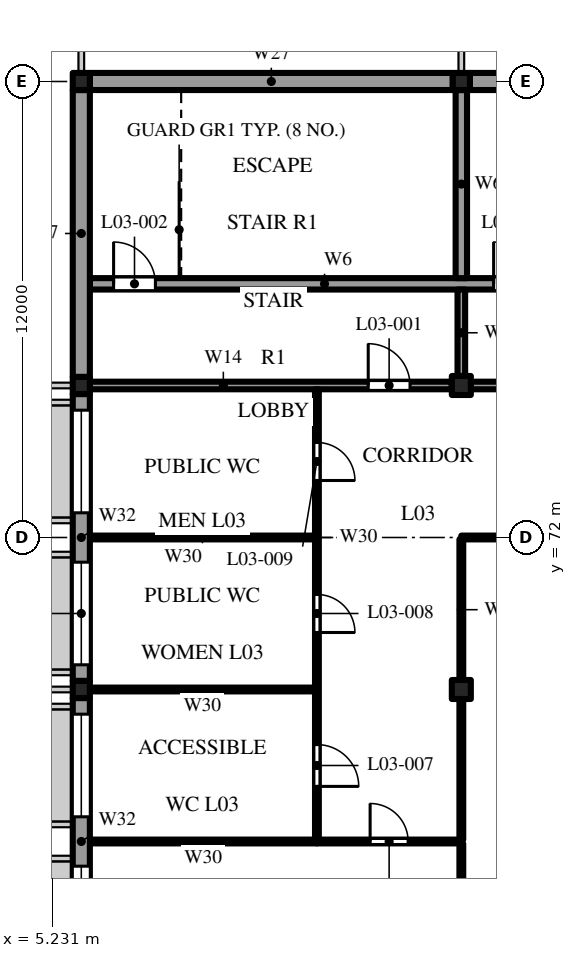
"""IFC4 building model, lengths in metres.
Left out: names, types, materials, properties, quantities, classifications, styles, units other than length and angle.
Written with IfcOpenShell. Run it as: python <this file> out.ifc"""

import sys

from ifc_helpers import new_model, si_unit, direction, frame, frame_2d, origin, origin_2d, place, context, subcontext, project, spatial, polyline, rectangle, outline, extrude, element, fill, save


model = new_model("IFC4")
c1 = context("Model", 3, precision=1e-05, world=origin(), true_north=direction((0.0, 1.0)))
c2 = subcontext(c1, "Body", "Model", "MODEL_VIEW")
j1 = project(units=[si_unit("LENGTHUNIT", "METRE"), si_unit("PLANEANGLEUNIT", "RADIAN")], contexts=[c1])
p1 = place(None, origin())
s1 = spatial("IfcSite", under=j1, at=p1, CompositionType="ELEMENT")
p2 = place(p1, origin())
s2 = spatial("IfcBuilding", under=s1, at=p2, CompositionType="ELEMENT")
p3 = place(p2, frame((0.0, 0.0, 16.8)))
s3 = spatial("IfcBuildingStorey", under=s2, at=p3, CompositionType="ELEMENT", Elevation=16.8)
for number, where, z_axis, x_axis in (
    (1, (6.0, 68.0, 0.0), (0.0, 0.0, 1.0), (1.0, 0.0, 0.0)),
    (2, (6.0, 76.0, 0.0), (0.0, 0.0, 1.0), (1.0, 0.0, 0.0)),
    (3, (6.0, 84.0, 0.0), (0.0, 0.0, 1.0), (1.0, 0.0, 0.0)),
):
    element("IfcColumn", number, at=place(p3, frame(where, z_axis=z_axis, x_axis=x_axis)), inside=s3, PredefinedType="COLUMN", context=c2, shape_type="SweptSolid", body=[
        extrude(rectangle(XDim=0.45, YDim=0.45, at=origin_2d()), origin(), (0.0, 0.0, 1.0), 4.8),
    ])
for number, where, z_axis, x_axis in (
    (4, (16.0, 68.0, 0.0), (0.0, 0.0, 1.0), (1.0, 0.0, 0.0)),
    (5, (16.0, 76.0, 0.0), (0.0, 0.0, 1.0), (1.0, 0.0, 0.0)),
):
    element("IfcColumn", number, at=place(p3, frame(where, z_axis=z_axis, x_axis=x_axis)), inside=s3, PredefinedType="COLUMN", context=c2, shape_type="SweptSolid", body=[
        extrude(rectangle(XDim=0.5, YDim=0.5, at=origin_2d()), origin(), (0.0, 0.0, 1.0), 4.8),
    ])
p4 = place(p3, frame((16.0, 84.0, 0.0), z_axis=(0.0, 0.0, 1.0), x_axis=(1.0, 0.0, 0.0)))
e6 = element("IfcColumn", 6, at=p4, inside=s3, PredefinedType="COLUMN", context=c2, shape_type="SweptSolid", body=[
    extrude(rectangle(XDim=0.45, YDim=0.45, at=origin_2d()), origin(), (0.0, 0.0, 1.0), 4.8),
])
p5 = place(p3, frame((6.225, 64.0, 0.0), z_axis=(0.0, 0.0, 1.0), x_axis=(1.0, 0.0, 0.0)))
e7 = element("IfcWall", 7, at=p5, inside=s3, PredefinedType="PARTITIONING", context=c2, shape_type="SweptSolid", body=[
    extrude(rectangle(XDim=5.975, YDim=0.1, at=frame_2d((2.987, 0.0))), origin(), (0.0, 0.0, 1.0), 7.792),
])
p6 = place(p3, frame((12.2, 64.0, 0.0), z_axis=(0.0, 0.0, 1.0), x_axis=(1.0, 0.0, 0.0)))
e8 = element("IfcWall", 8, at=p6, inside=s3, PredefinedType="PARTITIONING", context=c2, shape_type="SweptSolid", body=[
    extrude(rectangle(XDim=3.8, YDim=0.1, at=frame_2d((1.9, 0.0))), origin(), (0.0, 0.0, 1.0), 7.792),
])
p7 = place(p6, frame((1.4, 0.0, 0.0)))
e9 = element("IfcOpeningElement", 9, at=p7, cuts=e8, PredefinedType="OPENING", context=c2, shape_type="SweptSolid", body=[
    extrude(rectangle(XDim=1.0, YDim=2.1, at=frame_2d((0.5, 1.05))), frame((0.0, 0.06, 0.0), z_axis=(0.0, -1.0, 0.0), x_axis=(1.0, 0.0, 0.0)), (0.0, 0.0, 1.0), 0.12),
])
p8 = place(p3, frame((6.225, 68.0, 0.0), z_axis=(0.0, 0.0, 1.0), x_axis=(1.0, 0.0, 0.0)))
e10 = element("IfcWall", 10, at=p8, inside=s3, PredefinedType="PARTITIONING", context=c2, shape_type="SweptSolid", body=[
    extrude(rectangle(XDim=5.925, YDim=0.1, at=frame_2d((2.962, 0.0))), origin(), (0.0, 0.0, 1.0), 8.642),
])
p9 = place(p3, frame((6.225, 72.0, 0.0), z_axis=(0.0, 0.0, 1.0), x_axis=(1.0, 0.0, 0.0)))
e11 = element("IfcWall", 11, at=p9, inside=s3, PredefinedType="PARTITIONING", context=c2, shape_type="SweptSolid", body=[
    extrude(rectangle(XDim=5.925, YDim=0.1, at=frame_2d((2.962, 0.0))), origin(), (0.0, 0.0, 1.0), 9.493),
])
p10 = place(p3, frame((16.0, 72.0, 0.0), z_axis=(0.0, 0.0, 1.0), x_axis=(1.0, 0.0, 0.0)))
e12 = element("IfcWall", 12, at=p10, inside=s3, PredefinedType="PARTITIONING", context=c2, shape_type="SweptSolid", body=[
    extrude(rectangle(XDim=29.775, YDim=0.1, at=frame_2d((14.887, 0.0))), origin(), (0.0, 0.0, 1.0), 9.493),
])
p11 = place(p10, frame((9.1, 0.0, 0.0)))
e13 = element("IfcOpeningElement", 13, at=p11, cuts=e12, PredefinedType="OPENING", context=c2, shape_type="SweptSolid", body=[
    extrude(rectangle(XDim=1.8, YDim=2.1, at=frame_2d((0.9, 1.05))), frame((0.0, 0.06, 0.0), z_axis=(0.0, -1.0, 0.0), x_axis=(1.0, 0.0, 0.0)), (0.0, 0.0, 1.0), 0.12),
])
p12 = place(p10, frame((24.5, 0.0, 0.0)))
e14 = element("IfcOpeningElement", 14, at=p12, cuts=e12, PredefinedType="OPENING", context=c2, shape_type="SweptSolid", body=[
    extrude(rectangle(XDim=1.0, YDim=2.1, at=frame_2d((0.5, 1.05))), frame((0.0, 0.06, 0.0), z_axis=(0.0, -1.0, 0.0), x_axis=(1.0, 0.0, 0.0)), (0.0, 0.0, 1.0), 0.12),
])
p13 = place(p3, frame((6.225, 76.0, 0.0), z_axis=(0.0, 0.0, 1.0), x_axis=(1.0, 0.0, 0.0)))
e15 = element("IfcWall", 15, at=p13, inside=s3, PredefinedType="SOLIDWALL", context=c2, shape_type="SweptSolid", body=[
    extrude(rectangle(XDim=9.525, YDim=0.2, at=frame_2d((4.762, 0.0))), origin(), (0.0, 0.0, 1.0), 10.343),
])
p14 = place(p13, frame((7.325, 0.0, 0.0)))
e16 = element("IfcOpeningElement", 16, at=p14, cuts=e15, PredefinedType="OPENING", context=c2, shape_type="SweptSolid", body=[
    extrude(rectangle(XDim=1.1, YDim=2.1, at=frame_2d((0.55, 1.05))), frame((0.0, 0.11, 0.0), z_axis=(0.0, -1.0, 0.0), x_axis=(1.0, 0.0, 0.0)), (0.0, 0.0, 1.0), 0.22),
])
p15 = place(p3, frame((16.25, 76.0, 0.0), z_axis=(0.0, 0.0, 1.0), x_axis=(1.0, 0.0, 0.0)))
e17 = element("IfcWall", 17, at=p15, inside=s3, PredefinedType="SOLIDWALL", context=c2, shape_type="SweptSolid", body=[
    extrude(rectangle(XDim=9.5, YDim=0.2, at=frame_2d((4.75, 0.0))), origin(), (0.0, 0.0, 1.0), 10.343),
])
p16 = place(p15, frame((4.2, 0.0, 0.0)))
e18 = element("IfcOpeningElement", 18, at=p16, cuts=e17, PredefinedType="OPENING", context=c2, shape_type="SweptSolid", body=[
    extrude(rectangle(XDim=1.1, YDim=2.1, at=frame_2d((0.55, 1.05))), frame((0.0, 0.11, 0.0), z_axis=(0.0, -1.0, 0.0), x_axis=(1.0, 0.0, 0.0)), (0.0, 0.0, 1.0), 0.22),
])
p17 = place(p3, frame((6.225, 78.675, 0.0), z_axis=(0.0, 0.0, 1.0), x_axis=(1.0, 0.0, 0.0)))
e19 = element("IfcWall", 19, at=p17, inside=s3, PredefinedType="SHEAR", context=c2, shape_type="SweptSolid", body=[
    extrude(rectangle(XDim=19.775, YDim=0.3, at=frame_2d((9.887, 0.0))), origin(), (0.0, 0.0, 1.0), 10.911),
])
p18 = place(p17, frame((0.625, 0.0, 0.0)))
e20 = element("IfcOpeningElement", 20, at=p18, cuts=e19, PredefinedType="OPENING", context=c2, shape_type="SweptSolid", body=[
    extrude(rectangle(XDim=1.1, YDim=2.1, at=frame_2d((0.55, 1.05))), frame((0.0, 0.16, 0.0), z_axis=(0.0, -1.0, 0.0), x_axis=(1.0, 0.0, 0.0)), (0.0, 0.0, 1.0), 0.32),
])
p19 = place(p17, frame((10.625, 0.0, 0.0)))
e21 = element("IfcOpeningElement", 21, at=p19, cuts=e19, PredefinedType="OPENING", context=c2, shape_type="SweptSolid", body=[
    extrude(rectangle(XDim=1.1, YDim=2.1, at=frame_2d((0.55, 1.05))), frame((0.0, 0.16, 0.0), z_axis=(0.0, -1.0, 0.0), x_axis=(1.0, 0.0, 0.0)), (0.0, 0.0, 1.0), 0.32),
])
for number, where, z_axis, x_axis in (
    (22, (15.775, 84.0, 0.0), (0.0, 0.0, 1.0), (-1.0, 0.0, 0.0)),
    (23, (25.775, 84.0, 0.0), (0.0, 0.0, 1.0), (-1.0, 0.0, 0.0)),
):
    element("IfcWall", number, at=place(p3, frame(where, z_axis=z_axis, x_axis=x_axis)), inside=s3, PredefinedType="SOLIDWALL", context=c2, shape_type="SweptSolid", body=[
        extrude(rectangle(XDim=9.55, YDim=0.45, at=frame_2d((4.775, 0.0))), origin(), (0.0, 0.0, 1.0), 12.043),
    ])
p20 = place(p3, frame((6.0, 67.775, 0.0), z_axis=(0.0, 0.0, 1.0), x_axis=(0.0, -1.0, 0.0)))
e24 = element("IfcWall", 24, at=p20, inside=s3, PredefinedType="SOLIDWALL", context=c2, shape_type="SweptSolid", body=[
    extrude(outline(polyline([(0.0, 0.0), (7.55, 0.0), (7.55, 6.99), (0.0, 8.595), (0.0, 0.0)])), frame((0.0, 0.225, 0.0), z_axis=(0.0, -1.0, 0.0), x_axis=(1.0, 0.0, 0.0)), (0.0, 0.0, 1.0), 0.45),
])
p21 = place(p20, frame((4.425, 0.0, 0.8)))
e25 = element("IfcOpeningElement", 25, at=p21, cuts=e24, PredefinedType="OPENING", context=c2, shape_type="SweptSolid", body=[
    extrude(rectangle(XDim=2.7, YDim=2.4, at=frame_2d((1.35, 1.2))), frame((0.0, 0.235, 0.0), z_axis=(0.0, -1.0, 0.0), x_axis=(1.0, 0.0, 0.0)), (0.0, 0.0, 1.0), 0.47),
])
p22 = place(p20, frame((0.425, 0.0, 0.8)))
e26 = element("IfcOpeningElement", 26, at=p22, cuts=e24, PredefinedType="OPENING", context=c2, shape_type="SweptSolid", body=[
    extrude(rectangle(XDim=2.7, YDim=2.4, at=frame_2d((1.35, 1.2))), frame((0.0, 0.235, 0.0), z_axis=(0.0, -1.0, 0.0), x_axis=(1.0, 0.0, 0.0)), (0.0, 0.0, 1.0), 0.47),
])
p23 = place(p3, frame((6.0, 75.775, 0.0), z_axis=(0.0, 0.0, 1.0), x_axis=(0.0, -1.0, 0.0)))
e27 = element("IfcWall", 27, at=p23, inside=s3, PredefinedType="SOLIDWALL", context=c2, shape_type="SweptSolid", body=[
    extrude(outline(polyline([(0.0, 0.0), (7.55, 0.0), (7.55, 8.69), (0.0, 10.295), (0.0, 0.0)])), frame((0.0, 0.225, 0.0), z_axis=(0.0, -1.0, 0.0), x_axis=(1.0, 0.0, 0.0)), (0.0, 0.0, 1.0), 0.45),
])
p24 = place(p23, frame((4.425, 0.0, 0.8)))
e28 = element("IfcOpeningElement", 28, at=p24, cuts=e27, PredefinedType="OPENING", context=c2, shape_type="SweptSolid", body=[
    extrude(rectangle(XDim=2.7, YDim=2.4, at=frame_2d((1.35, 1.2))), frame((0.0, 0.235, 0.0), z_axis=(0.0, -1.0, 0.0), x_axis=(1.0, 0.0, 0.0)), (0.0, 0.0, 1.0), 0.47),
])
p25 = place(p23, frame((0.425, 0.0, 0.8)))
e29 = element("IfcOpeningElement", 29, at=p25, cuts=e27, PredefinedType="OPENING", context=c2, shape_type="SweptSolid", body=[
    extrude(rectangle(XDim=2.7, YDim=2.4, at=frame_2d((1.35, 1.2))), frame((0.0, 0.235, 0.0), z_axis=(0.0, -1.0, 0.0), x_axis=(1.0, 0.0, 0.0)), (0.0, 0.0, 1.0), 0.47),
])
p26 = place(p3, frame((6.0, 83.775, 0.0), z_axis=(0.0, 0.0, 1.0), x_axis=(0.0, -1.0, 0.0)))
e30 = element("IfcWall", 30, at=p26, inside=s3, PredefinedType="SOLIDWALL", context=c2, shape_type="SweptSolid", body=[
    extrude(outline(polyline([(0.0, 0.0), (7.55, 0.0), (7.55, 10.391), (0.0, 11.996), (0.0, 0.0)])), frame((0.0, 0.225, 0.0), z_axis=(0.0, -1.0, 0.0), x_axis=(1.0, 0.0, 0.0)), (0.0, 0.0, 1.0), 0.45),
])
p27 = place(p3, frame((12.2, 64.05, 0.0), z_axis=(0.0, 0.0, 1.0), x_axis=(0.0, 1.0, 0.0)))
e31 = element("IfcWall", 31, at=p27, inside=s3, PredefinedType="PARTITIONING", context=c2, shape_type="SweptSolid", body=[
    extrude(outline(polyline([(0.0, 0.0), (11.85, 0.0), (11.85, 10.322), (0.0, 7.803), (0.0, 0.0)])), frame((0.0, 0.05, 0.0), z_axis=(0.0, -1.0, 0.0), x_axis=(1.0, 0.0, 0.0)), (0.0, 0.0, 1.0), 0.1),
])
p28 = place(p27, frame((1.4, 0.0, 0.0)))
e32 = element("IfcOpeningElement", 32, at=p28, cuts=e31, PredefinedType="OPENING", context=c2, shape_type="SweptSolid", body=[
    extrude(rectangle(XDim=1.1, YDim=2.1, at=frame_2d((0.55, 1.05))), frame((0.0, 0.06, 0.0), z_axis=(0.0, -1.0, 0.0), x_axis=(1.0, 0.0, 0.0)), (0.0, 0.0, 1.0), 0.12),
])
p29 = place(p27, frame((5.45, 0.0, 0.0)))
e33 = element("IfcOpeningElement", 33, at=p29, cuts=e31, PredefinedType="OPENING", context=c2, shape_type="SweptSolid", body=[
    extrude(rectangle(XDim=1.0, YDim=2.1, at=frame_2d((0.5, 1.05))), frame((0.0, 0.06, 0.0), z_axis=(0.0, -1.0, 0.0), x_axis=(1.0, 0.0, 0.0)), (0.0, 0.0, 1.0), 0.12),
])
p30 = place(p27, frame((9.45, 0.0, 0.0)))
e34 = element("IfcOpeningElement", 34, at=p30, cuts=e31, PredefinedType="OPENING", context=c2, shape_type="SweptSolid", body=[
    extrude(rectangle(XDim=1.0, YDim=2.1, at=frame_2d((0.5, 1.05))), frame((0.0, 0.06, 0.0), z_axis=(0.0, -1.0, 0.0), x_axis=(1.0, 0.0, 0.0)), (0.0, 0.0, 1.0), 0.12),
])
p31 = place(p3, frame((16.0, 60.25, 0.0), z_axis=(0.0, 0.0, 1.0), x_axis=(0.0, 1.0, 0.0)))
e35 = element("IfcWall", 35, at=p31, inside=s3, PredefinedType="PARTITIONING", context=c2, shape_type="SweptSolid", body=[
    extrude(outline(polyline([(0.0, 0.0), (3.7, 0.0), (3.7, 7.781), (0.0, 6.995), (0.0, 0.0)])), frame((0.0, 0.05, 0.0), z_axis=(0.0, -1.0, 0.0), x_axis=(1.0, 0.0, 0.0)), (0.0, 0.0, 1.0), 0.1),
])
p32 = place(p3, frame((16.0, 64.05, 0.0), z_axis=(0.0, 0.0, 1.0), x_axis=(0.0, 1.0, 0.0)))
e36 = element("IfcWall", 36, at=p32, inside=s3, PredefinedType="PARTITIONING", context=c2, shape_type="SweptSolid", body=[
    extrude(outline(polyline([(0.0, 0.0), (3.7, 0.0), (3.7, 8.589), (0.0, 7.803), (0.0, 0.0)])), frame((0.0, 0.05, 0.0), z_axis=(0.0, -1.0, 0.0), x_axis=(1.0, 0.0, 0.0)), (0.0, 0.0, 1.0), 0.1),
])
p33 = place(p3, frame((16.0, 68.25, 0.0), z_axis=(0.0, 0.0, 1.0), x_axis=(0.0, 1.0, 0.0)))
e37 = element("IfcWall", 37, at=p33, inside=s3, PredefinedType="PARTITIONING", context=c2, shape_type="SweptSolid", body=[
    extrude(outline(polyline([(0.0, 0.0), (3.7, 0.0), (3.7, 9.482), (0.0, 8.696), (0.0, 0.0)])), frame((0.0, 0.05, 0.0), z_axis=(0.0, -1.0, 0.0), x_axis=(1.0, 0.0, 0.0)), (0.0, 0.0, 1.0), 0.1),
])
p34 = place(p3, frame((16.0, 76.25, 0.0), z_axis=(0.0, 0.0, 1.0), x_axis=(0.0, 1.0, 0.0)))
e38 = element("IfcWall", 38, at=p34, inside=s3, PredefinedType="SOLIDWALL", context=c2, shape_type="SweptSolid", body=[
    extrude(outline(polyline([(0.0, 0.0), (2.275, 0.0), (2.275, 10.88), (0.0, 10.396), (0.0, 0.0)])), frame((0.0, 0.1, 0.0), z_axis=(0.0, -1.0, 0.0), x_axis=(1.0, 0.0, 0.0)), (0.0, 0.0, 1.0), 0.2),
])
p35 = place(p3, frame((16.0, 78.825, 0.0), z_axis=(0.0, 0.0, 1.0), x_axis=(0.0, 1.0, 0.0)))
e39 = element("IfcWall", 39, at=p35, inside=s3, PredefinedType="SHEAR", context=c2, shape_type="SweptSolid", body=[
    extrude(outline(polyline([(0.0, 0.0), (4.95, 0.0), (4.95, 11.996), (0.0, 10.943), (0.0, 0.0)])), frame((0.0, 0.15, 0.0), z_axis=(0.0, -1.0, 0.0), x_axis=(1.0, 0.0, 0.0)), (0.0, 0.0, 1.0), 0.3),
])
p36 = place(p14, origin())
e40 = element("IfcDoor", 40, at=p36, inside=s3, OperationType="SINGLE_SWING_LEFT", PredefinedType="DOOR", context=c2, shape_type="SweptSolid", body=[
    extrude(rectangle(XDim=1.1, YDim=2.1, at=frame_2d((0.55, 1.05))), frame((0.0, 0.025, 0.0), z_axis=(0.0, -1.0, 0.0), x_axis=(1.0, 0.0, 0.0)), (0.0, 0.0, 1.0), 0.05),
])
fill(e16, e40)
p37 = place(p18, origin())
e41 = element("IfcDoor", 41, at=p37, inside=s3, OperationType="SINGLE_SWING_RIGHT", PredefinedType="DOOR", context=c2, shape_type="SweptSolid", body=[
    extrude(rectangle(XDim=1.1, YDim=2.1, at=frame_2d((0.55, 1.05))), frame((0.0, 0.025, 0.0), z_axis=(0.0, -1.0, 0.0), x_axis=(1.0, 0.0, 0.0)), (0.0, 0.0, 1.0), 0.05),
])
fill(e20, e41)
p38 = place(p19, origin())
e42 = element("IfcDoor", 42, at=p38, inside=s3, OperationType="SINGLE_SWING_RIGHT", PredefinedType="DOOR", context=c2, shape_type="SweptSolid", body=[
    extrude(rectangle(XDim=1.1, YDim=2.1, at=frame_2d((0.55, 1.05))), frame((0.0, 0.025, 0.0), z_axis=(0.0, -1.0, 0.0), x_axis=(1.0, 0.0, 0.0)), (0.0, 0.0, 1.0), 0.05),
])
fill(e21, e42)
p39 = place(p28, frame((1.1, 0.0, 0.0), z_axis=(0.0, 0.0, 1.0), x_axis=(-1.0, 0.0, 0.0)))
e43 = element("IfcDoor", 43, at=p39, inside=s3, OperationType="SINGLE_SWING_RIGHT", PredefinedType="DOOR", context=c2, shape_type="SweptSolid", body=[
    extrude(rectangle(XDim=1.1, YDim=2.1, at=frame_2d((0.55, 1.05))), frame((0.0, 0.025, 0.0), z_axis=(0.0, -1.0, 0.0), x_axis=(1.0, 0.0, 0.0)), (0.0, 0.0, 1.0), 0.05),
])
fill(e32, e43)
p40 = place(p29, frame((1.0, 0.0, 0.0), z_axis=(0.0, 0.0, 1.0), x_axis=(-1.0, 0.0, 0.0)))
e44 = element("IfcDoor", 44, at=p40, inside=s3, OperationType="SINGLE_SWING_LEFT", PredefinedType="DOOR", context=c2, shape_type="SweptSolid", body=[
    extrude(rectangle(XDim=1.0, YDim=2.1, at=frame_2d((0.5, 1.05))), frame((0.0, 0.025, 0.0), z_axis=(0.0, -1.0, 0.0), x_axis=(1.0, 0.0, 0.0)), (0.0, 0.0, 1.0), 0.05),
])
fill(e33, e44)
p41 = place(p30, frame((1.0, 0.0, 0.0), z_axis=(0.0, 0.0, 1.0), x_axis=(-1.0, 0.0, 0.0)))
e45 = element("IfcDoor", 45, at=p41, inside=s3, OperationType="SINGLE_SWING_RIGHT", PredefinedType="DOOR", context=c2, shape_type="SweptSolid", body=[
    extrude(rectangle(XDim=1.0, YDim=2.1, at=frame_2d((0.5, 1.05))), frame((0.0, 0.025, 0.0), z_axis=(0.0, -1.0, 0.0), x_axis=(1.0, 0.0, 0.0)), (0.0, 0.0, 1.0), 0.05),
])
fill(e34, e45)
p42 = place(p7, origin())
e46 = element("IfcDoor", 46, at=p42, inside=s3, OperationType="SINGLE_SWING_RIGHT", PredefinedType="DOOR", context=c2, shape_type="SweptSolid", body=[
    extrude(rectangle(XDim=1.0, YDim=2.1, at=frame_2d((0.5, 1.05))), frame((0.0, 0.025, 0.0), z_axis=(0.0, -1.0, 0.0), x_axis=(1.0, 0.0, 0.0)), (0.0, 0.0, 1.0), 0.05),
])
fill(e9, e46)
p43 = place(p21, origin())
e47 = element("IfcWindow", 47, at=p43, inside=s3, PartitioningType="SINGLE_PANEL", PredefinedType="WINDOW", context=c2, shape_type="SweptSolid", body=[
    extrude(rectangle(XDim=2.7, YDim=2.4, at=frame_2d((1.35, 1.2))), frame((0.0, 0.215, 0.0), z_axis=(0.0, -1.0, 0.0), x_axis=(1.0, 0.0, 0.0)), (0.0, 0.0, 1.0), 0.06),
])
fill(e25, e47)
p44 = place(p22, origin())
e48 = element("IfcWindow", 48, at=p44, inside=s3, PartitioningType="SINGLE_PANEL", PredefinedType="WINDOW", context=c2, shape_type="SweptSolid", body=[
    extrude(rectangle(XDim=2.7, YDim=2.4, at=frame_2d((1.35, 1.2))), frame((0.0, 0.215, 0.0), z_axis=(0.0, -1.0, 0.0), x_axis=(1.0, 0.0, 0.0)), (0.0, 0.0, 1.0), 0.06),
])
fill(e26, e48)
p45 = place(p24, origin())
e49 = element("IfcWindow", 49, at=p45, inside=s3, PartitioningType="SINGLE_PANEL", PredefinedType="WINDOW", context=c2, shape_type="SweptSolid", body=[
    extrude(rectangle(XDim=2.7, YDim=2.4, at=frame_2d((1.35, 1.2))), frame((0.0, 0.215, 0.0), z_axis=(0.0, -1.0, 0.0), x_axis=(1.0, 0.0, 0.0)), (0.0, 0.0, 1.0), 0.06),
])
fill(e28, e49)
p46 = place(p25, origin())
e50 = element("IfcWindow", 50, at=p46, inside=s3, PartitioningType="SINGLE_PANEL", PredefinedType="WINDOW", context=c2, shape_type="SweptSolid", body=[
    extrude(rectangle(XDim=2.7, YDim=2.4, at=frame_2d((1.35, 1.2))), frame((0.0, 0.215, 0.0), z_axis=(0.0, -1.0, 0.0), x_axis=(1.0, 0.0, 0.0)), (0.0, 0.0, 1.0), 0.06),
])
fill(e29, e50)
save(model, sys.argv[1])
